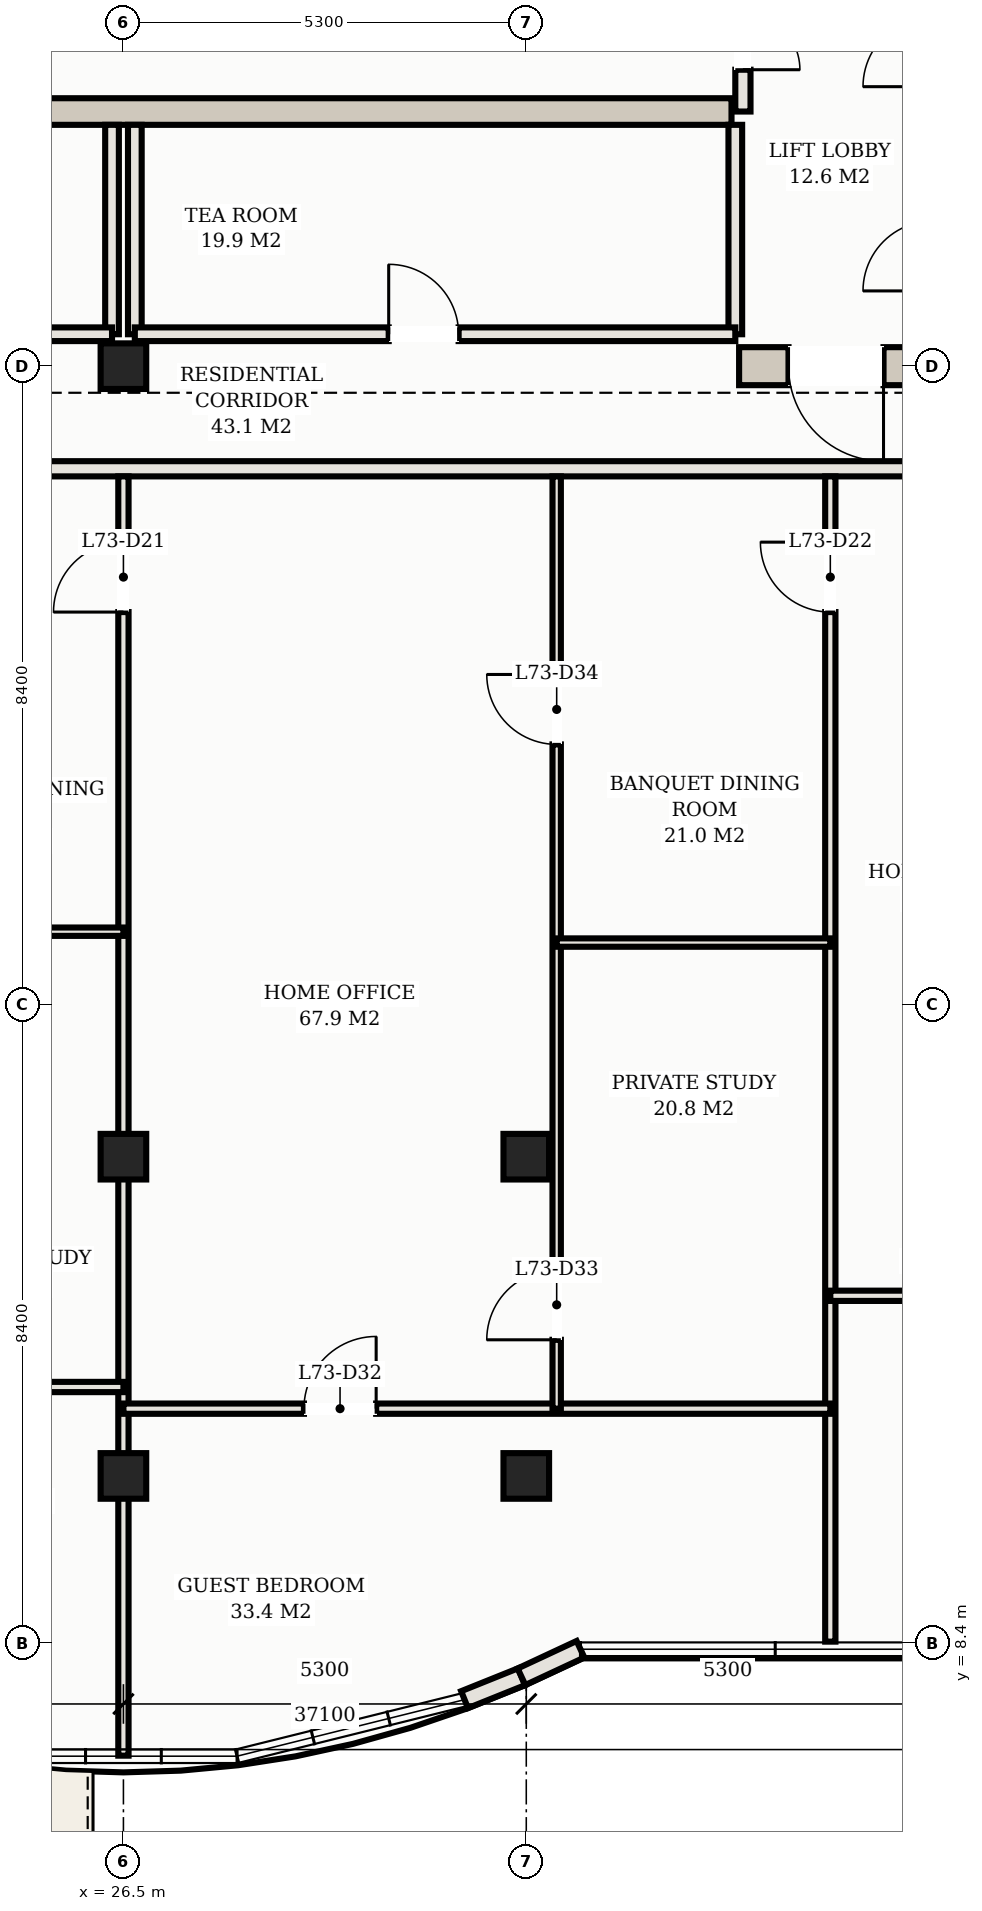
"""IFC4 building model, lengths in metres.
Left out: names, types, materials, properties, quantities, classifications, styles, units other than length and angle.
Written with IfcOpenShell. Run it as: python <this file> out.ifc"""

import sys

from ifc_helpers import new_model, si_unit, direction, frame, frame_2d, origin, origin_2d, place, context, subcontext, project, spatial, rectangle, hollow_rectangle, extrude, element, fill, save


model = new_model("IFC4")
c1 = context("Model", 3, precision=1e-05, world=origin(), true_north=direction((0.0, 1.0)))
c2 = subcontext(c1, "Body", "Model", "MODEL_VIEW")
j1 = project(units=[si_unit("LENGTHUNIT", "METRE"), si_unit("PLANEANGLEUNIT", "RADIAN")], contexts=[c1])
p1 = place(None, origin())
s1 = spatial("IfcSite", under=j1, at=p1, CompositionType="ELEMENT")
p2 = place(p1, origin())
s2 = spatial("IfcBuilding", under=s1, at=p2, CompositionType="ELEMENT")
p3 = place(p2, frame((0.0, 0.0, 262.7)))
s3 = spatial("IfcBuildingStorey", under=s2, at=p3, CompositionType="ELEMENT", Elevation=262.7)
p4 = place(p3, frame((34.6, 25.2, 0.0), z_axis=(0.0, 0.0, 1.0), x_axis=(1.0, 0.0, 0.0)))
e1 = element("IfcWall", 1, at=p4, inside=s3, PredefinedType="SHEAR", context=c2, shape_type="SweptSolid", body=[
    extrude(rectangle(XDim=8.05, YDim=0.5, at=frame_2d((4.025, 0.0))), origin(), (0.0, 0.0, 1.0), 3.04),
])
p5 = place(p4, frame((0.65, 0.0, 0.0)))
e2 = element("IfcOpeningElement", 2, at=p5, cuts=e1, PredefinedType="OPENING", context=c2, shape_type="SweptSolid", body=[
    extrude(rectangle(XDim=1.25, YDim=2.2, at=frame_2d((0.625, 1.1))), frame((0.0, 0.26, 0.0), z_axis=(0.0, -1.0, 0.0), x_axis=(1.0, 0.0, 0.0)), (0.0, 0.0, 1.0), 0.52),
])
p6 = place(p3, frame((18.5, 28.55, 0.0), z_axis=(0.0, 0.0, 1.0), x_axis=(1.0, 0.0, 0.0)))
e3 = element("IfcWall", 3, at=p6, inside=s3, PredefinedType="SHEAR", context=c2, shape_type="SweptSolid", body=[
    extrude(rectangle(XDim=16.0, YDim=0.35, at=frame_2d((8.0, 0.0))), origin(), (0.0, 0.0, 1.0), 3.04),
])
for number, where, z_axis, x_axis in (
    (4, (26.5, 25.2, 0.0), (0.0, 0.0, 1.0), (1.0, 0.0, 0.0)),
    (5, (26.5, 14.8, 0.0), (0.0, 0.0, 1.0), (1.0, 0.0, 0.0)),
):
    element("IfcColumn", number, at=place(p3, frame(where, z_axis=z_axis, x_axis=x_axis)), inside=s3, PredefinedType="COLUMN", context=c2, shape_type="SweptSolid", body=[
        extrude(hollow_rectangle(XDim=0.6, YDim=0.6, WallThickness=0.022, at=origin_2d()), origin(), (0.0, 0.0, 1.0), 3.3),
    ])
p7 = place(p3, frame((26.5, 10.6, 0.0), z_axis=(0.0, 0.0, 1.0), x_axis=(1.0, 0.0, 0.0)))
e6 = element("IfcColumn", 6, at=p7, inside=s3, PredefinedType="COLUMN", context=c2, shape_type="SweptSolid", body=[
    extrude(hollow_rectangle(XDim=0.6, YDim=0.6, WallThickness=0.022, at=origin_2d()), origin(), (0.0, 0.0, 1.0), 3.264),
])
p8 = place(p3, frame((31.8, 14.8, 0.0), z_axis=(0.0, 0.0, 1.0), x_axis=(1.0, 0.0, 0.0)))
e7 = element("IfcColumn", 7, at=p8, inside=s3, PredefinedType="COLUMN", context=c2, shape_type="SweptSolid", body=[
    extrude(hollow_rectangle(XDim=0.6, YDim=0.6, WallThickness=0.022, at=origin_2d()), origin(), (0.0, 0.0, 1.0), 3.3),
])
p9 = place(p3, frame((31.8, 10.6, 0.0), z_axis=(0.0, 0.0, 1.0), x_axis=(1.0, 0.0, 0.0)))
e8 = element("IfcColumn", 8, at=p9, inside=s3, PredefinedType="COLUMN", context=c2, shape_type="SweptSolid", body=[
    extrude(hollow_rectangle(XDim=0.6, YDim=0.6, WallThickness=0.022, at=origin_2d()), origin(), (0.0, 0.0, 1.0), 3.264),
])
p10 = place(p3, frame((30.988, 7.657, 0.0), z_axis=(0.0, 0.0, 1.0), x_axis=(0.927870589467, 0.372902358805, 0.0)))
e9 = element("IfcWall", 9, at=p10, inside=s3, PredefinedType="SOLIDWALL", context=c2, shape_type="SweptSolid", body=[
    extrude(rectangle(XDim=0.807, YDim=0.24, at=frame_2d((0.404, 0.0))), origin(), (0.0, 0.0, 1.0), 3.04),
])
p11 = place(p3, frame((31.737, 7.958, 0.0), z_axis=(0.0, 0.0, 1.0), x_axis=(0.906190424584, 0.422869855147, 0.0)))
e10 = element("IfcWall", 10, at=p11, inside=s3, PredefinedType="SOLIDWALL", context=c2, shape_type="SweptSolid", body=[
    extrude(rectangle(XDim=0.856, YDim=0.24, at=frame_2d((0.428, 0.0))), origin(), (0.0, 0.0, 1.0), 3.04),
])
p12 = place(p3, frame((34.65, 28.55, 0.0), z_axis=(0.0, 0.0, 1.0), x_axis=(0.0, 1.0, 0.0)))
e11 = element("IfcWall", 11, at=p12, inside=s3, PredefinedType="PARTITIONING", context=c2, shape_type="SweptSolid", body=[
    extrude(rectangle(XDim=2.6, YDim=0.2, at=frame_2d((1.3, 0.0))), origin(), (0.0, 0.0, 1.0), 2.38),
])
p13 = place(p12, frame((0.55, 0.0, 0.0)))
e12 = element("IfcOpeningElement", 12, at=p13, cuts=e11, PredefinedType="OPENING", context=c2, shape_type="SweptSolid", body=[
    extrude(rectangle(XDim=1.5, YDim=2.25, at=frame_2d((0.75, 1.125))), frame((0.0, 0.11, 0.0), z_axis=(0.0, -1.0, 0.0), x_axis=(1.0, 0.0, 0.0)), (0.0, 0.0, 1.0), 0.22),
])
p14 = place(p3, frame((26.35, 25.62, 0.0), z_axis=(0.0, 0.0, 1.0), x_axis=(0.0, 1.0, 0.0)))
e13 = element("IfcWall", 13, at=p14, inside=s3, PredefinedType="PARTITIONING", context=c2, shape_type="SweptSolid", body=[
    extrude(rectangle(XDim=2.755, YDim=0.18, at=frame_2d((1.377, 0.0))), origin(), (0.0, 0.0, 1.0), 2.38),
])
p15 = place(p3, frame((18.45, 25.62, 0.0), z_axis=(0.0, 0.0, 1.0), x_axis=(1.0, 0.0, 0.0)))
e14 = element("IfcWall", 14, at=p15, inside=s3, PredefinedType="PARTITIONING", context=c2, shape_type="SweptSolid", body=[
    extrude(rectangle(XDim=7.9, YDim=0.18, at=frame_2d((3.95, 0.0))), origin(), (0.0, 0.0, 1.0), 2.38),
])
p16 = place(p15, frame((3.34, 0.0, 0.0)))
e15 = element("IfcOpeningElement", 15, at=p16, cuts=e14, PredefinedType="OPENING", context=c2, shape_type="SweptSolid", body=[
    extrude(rectangle(XDim=0.92, YDim=2.15, at=frame_2d((0.46, 1.075))), frame((0.0, 0.1, 0.0), z_axis=(0.0, -1.0, 0.0), x_axis=(1.0, 0.0, 0.0)), (0.0, 0.0, 1.0), 0.2),
])
for number, where, z_axis, x_axis in (
    (16, (26.65, 25.62, 0.0), (0.0, 0.0, 1.0), (0.0, 1.0, 0.0)),
    (17, (34.55, 25.62, 0.0), (0.0, 0.0, 1.0), (0.0, 1.0, 0.0)),
):
    element("IfcWall", number, at=place(p3, frame(where, z_axis=z_axis, x_axis=x_axis)), inside=s3, PredefinedType="PARTITIONING", context=c2, shape_type="SweptSolid", body=[
        extrude(rectangle(XDim=2.755, YDim=0.18, at=frame_2d((1.377, 0.0))), origin(), (0.0, 0.0, 1.0), 2.38),
    ])
p17 = place(p3, frame((26.65, 25.62, 0.0), z_axis=(0.0, 0.0, 1.0), x_axis=(1.0, 0.0, 0.0)))
e18 = element("IfcWall", 18, at=p17, inside=s3, PredefinedType="PARTITIONING", context=c2, shape_type="SweptSolid", body=[
    extrude(rectangle(XDim=7.9, YDim=0.18, at=frame_2d((3.95, 0.0))), origin(), (0.0, 0.0, 1.0), 2.38),
])
p18 = place(p17, frame((3.34, 0.0, 0.0)))
e19 = element("IfcOpeningElement", 19, at=p18, cuts=e18, PredefinedType="OPENING", context=c2, shape_type="SweptSolid", body=[
    extrude(rectangle(XDim=0.92, YDim=2.15, at=frame_2d((0.46, 1.075))), frame((0.0, 0.1, 0.0), z_axis=(0.0, -1.0, 0.0), x_axis=(1.0, 0.0, 0.0)), (0.0, 0.0, 1.0), 0.2),
])
p19 = place(p3, frame((8.6, 23.85, 0.0), z_axis=(0.0, 0.0, 1.0), x_axis=(1.0, 0.0, 0.0)))
e20 = element("IfcWall", 20, at=p19, inside=s3, PredefinedType="PARTITIONING", context=c2, shape_type="SweptSolid", body=[
    extrude(rectangle(XDim=35.8, YDim=0.2, at=frame_2d((17.9, 0.0))), origin(), (0.0, 0.0, 1.0), 2.38),
])
p20 = place(p19, frame((2.625, 0.0, 0.0)))
e21 = element("IfcOpeningElement", 21, at=p20, cuts=e20, PredefinedType="OPENING", context=c2, shape_type="SweptSolid", body=[
    extrude(rectangle(XDim=1.35, YDim=2.26, at=frame_2d((0.675, 1.13))), frame((0.0, 0.11, 0.0), z_axis=(0.0, -1.0, 0.0), x_axis=(1.0, 0.0, 0.0)), (0.0, 0.0, 1.0), 0.22),
])
p21 = place(p19, frame((0.505, 0.0, 0.0)))
e22 = element("IfcOpeningElement", 22, at=p21, cuts=e20, PredefinedType="OPENING", context=c2, shape_type="SweptSolid", body=[
    extrude(rectangle(XDim=0.9, YDim=2.15, at=frame_2d((0.45, 1.075))), frame((0.0, 0.11, 0.0), z_axis=(0.0, -1.0, 0.0), x_axis=(1.0, 0.0, 0.0)), (0.0, 0.0, 1.0), 0.22),
])
p22 = place(p19, frame((34.395, 0.0, 0.0)))
e23 = element("IfcOpeningElement", 23, at=p22, cuts=e20, PredefinedType="OPENING", context=c2, shape_type="SweptSolid", body=[
    extrude(rectangle(XDim=0.9, YDim=2.15, at=frame_2d((0.45, 1.075))), frame((0.0, 0.11, 0.0), z_axis=(0.0, -1.0, 0.0), x_axis=(1.0, 0.0, 0.0)), (0.0, 0.0, 1.0), 0.22),
])
p23 = place(p3, frame((26.5, 6.92, 0.0), z_axis=(0.0, 0.0, 1.0), x_axis=(0.0, 1.0, 0.0)))
e24 = element("IfcWall", 24, at=p23, inside=s3, PredefinedType="PARTITIONING", context=c2, shape_type="SweptSolid", body=[
    extrude(rectangle(XDim=16.83, YDim=0.135, at=frame_2d((8.415, 0.0))), origin(), (0.0, 0.0, 1.0), 2.38),
])
p24 = place(p23, frame((15.045, 0.0, 0.0)))
e25 = element("IfcOpeningElement", 25, at=p24, cuts=e24, PredefinedType="OPENING", context=c2, shape_type="SweptSolid", body=[
    extrude(rectangle(XDim=0.92, YDim=2.15, at=frame_2d((0.46, 1.075))), frame((0.0, 0.078, 0.0), z_axis=(0.0, -1.0, 0.0), x_axis=(1.0, 0.0, 0.0)), (0.0, 0.0, 1.0), 0.155),
])
p25 = place(p3, frame((35.8, 8.42, 0.0), z_axis=(0.0, 0.0, 1.0), x_axis=(0.0, 1.0, 0.0)))
e26 = element("IfcWall", 26, at=p25, inside=s3, PredefinedType="PARTITIONING", context=c2, shape_type="SweptSolid", body=[
    extrude(rectangle(XDim=15.33, YDim=0.135, at=frame_2d((7.665, 0.0))), origin(), (0.0, 0.0, 1.0), 2.38),
])
p26 = place(p25, frame((13.545, 0.0, 0.0)))
e27 = element("IfcOpeningElement", 27, at=p26, cuts=e26, PredefinedType="OPENING", context=c2, shape_type="SweptSolid", body=[
    extrude(rectangle(XDim=0.92, YDim=2.15, at=frame_2d((0.46, 1.075))), frame((0.0, 0.078, 0.0), z_axis=(0.0, -1.0, 0.0), x_axis=(1.0, 0.0, 0.0)), (0.0, 0.0, 1.0), 0.155),
])
p27 = place(p3, frame((21.2, 11.77, 0.0), z_axis=(0.0, 0.0, 1.0), x_axis=(1.0, 0.0, 0.0)))
e28 = element("IfcWall", 28, at=p27, inside=s3, PredefinedType="PARTITIONING", context=c2, shape_type="SweptSolid", body=[
    extrude(rectangle(XDim=5.3, YDim=0.135, at=frame_2d((2.65, 0.0))), origin(), (0.0, 0.0, 1.0), 2.38),
])
p28 = place(p27, frame((0.8, 0.0, 0.0)))
e29 = element("IfcOpeningElement", 29, at=p28, cuts=e28, PredefinedType="OPENING", context=c2, shape_type="SweptSolid", body=[
    extrude(rectangle(XDim=0.95, YDim=2.15, at=frame_2d((0.475, 1.075))), frame((0.0, 0.078, 0.0), z_axis=(0.0, -1.0, 0.0), x_axis=(1.0, 0.0, 0.0)), (0.0, 0.0, 1.0), 0.155),
])
p29 = place(p3, frame((23.35, 17.76, 0.0), z_axis=(0.0, 0.0, 1.0), x_axis=(1.0, 0.0, 0.0)))
e30 = element("IfcWall", 30, at=p29, inside=s3, PredefinedType="MOVABLE", context=c2, shape_type="SweptSolid", body=[
    extrude(rectangle(XDim=3.15, YDim=0.11, at=frame_2d((1.575, 0.0))), origin(), (0.0, 0.0, 1.0), 2.38),
])
p30 = place(p3, frame((26.5, 11.485, 0.0), z_axis=(0.0, 0.0, 1.0), x_axis=(1.0, 0.0, 0.0)))
e31 = element("IfcWall", 31, at=p30, inside=s3, PredefinedType="PARTITIONING", context=c2, shape_type="SweptSolid", body=[
    extrude(rectangle(XDim=9.3, YDim=0.135, at=frame_2d((4.65, 0.0))), origin(), (0.0, 0.0, 1.0), 2.38),
])
p31 = place(p30, frame((2.375, 0.0, 0.0)))
e32 = element("IfcOpeningElement", 32, at=p31, cuts=e31, PredefinedType="OPENING", context=c2, shape_type="SweptSolid", body=[
    extrude(rectangle(XDim=0.95, YDim=2.15, at=frame_2d((0.475, 1.075))), frame((0.0, 0.078, 0.0), z_axis=(0.0, -1.0, 0.0), x_axis=(1.0, 0.0, 0.0)), (0.0, 0.0, 1.0), 0.155),
])
p32 = place(p3, frame((32.2, 11.485, 0.0), z_axis=(0.0, 0.0, 1.0), x_axis=(0.0, 1.0, 0.0)))
e33 = element("IfcWall", 33, at=p32, inside=s3, PredefinedType="MOVABLE", context=c2, shape_type="SweptSolid", body=[
    extrude(rectangle(XDim=12.265, YDim=0.11, at=frame_2d((6.132, 0.0))), origin(), (0.0, 0.0, 1.0), 2.38),
])
p33 = place(p32, frame((0.906, 0.0, 0.0)))
e34 = element("IfcOpeningElement", 34, at=p33, cuts=e33, PredefinedType="OPENING", context=c2, shape_type="SweptSolid", body=[
    extrude(rectangle(XDim=0.92, YDim=2.15, at=frame_2d((0.46, 1.075))), frame((0.0, 0.065, 0.0), z_axis=(0.0, -1.0, 0.0), x_axis=(1.0, 0.0, 0.0)), (0.0, 0.0, 1.0), 0.13),
])
p34 = place(p32, frame((8.739, 0.0, 0.0)))
e35 = element("IfcOpeningElement", 35, at=p34, cuts=e33, PredefinedType="OPENING", context=c2, shape_type="SweptSolid", body=[
    extrude(rectangle(XDim=0.92, YDim=2.15, at=frame_2d((0.46, 1.075))), frame((0.0, 0.065, 0.0), z_axis=(0.0, -1.0, 0.0), x_axis=(1.0, 0.0, 0.0)), (0.0, 0.0, 1.0), 0.13),
])
p35 = place(p3, frame((32.2, 17.617, 0.0), z_axis=(0.0, 0.0, 1.0), x_axis=(1.0, 0.0, 0.0)))
e36 = element("IfcWall", 36, at=p35, inside=s3, PredefinedType="MOVABLE", context=c2, shape_type="SweptSolid", body=[
    extrude(rectangle(XDim=3.6, YDim=0.11, at=frame_2d((1.8, 0.0))), origin(), (0.0, 0.0, 1.0), 2.38),
])
p36 = place(p3, frame((35.8, 12.97, 0.0), z_axis=(0.0, 0.0, 1.0), x_axis=(1.0, 0.0, 0.0)))
e37 = element("IfcWall", 37, at=p36, inside=s3, PredefinedType="PARTITIONING", context=c2, shape_type="SweptSolid", body=[
    extrude(rectangle(XDim=6.6, YDim=0.135, at=frame_2d((3.3, 0.0))), origin(), (0.0, 0.0, 1.0), 2.38),
])
p37 = place(p36, frame((1.025, 0.0, 0.0)))
e38 = element("IfcOpeningElement", 38, at=p37, cuts=e37, PredefinedType="OPENING", context=c2, shape_type="SweptSolid", body=[
    extrude(rectangle(XDim=0.95, YDim=2.15, at=frame_2d((0.475, 1.075))), frame((0.0, 0.078, 0.0), z_axis=(0.0, -1.0, 0.0), x_axis=(1.0, 0.0, 0.0)), (0.0, 0.0, 1.0), 0.155),
])
p38 = place(p5, frame((1.25, 0.0, 0.0), z_axis=(0.0, 0.0, 1.0), x_axis=(-1.0, 0.0, 0.0)))
e39 = element("IfcDoor", 39, at=p38, inside=s3, OperationType="SINGLE_SWING_LEFT", PredefinedType="DOOR", context=c2, shape_type="SweptSolid", body=[
    extrude(rectangle(XDim=1.25, YDim=2.2, at=frame_2d((0.625, 1.1))), frame((0.0, 0.025, 0.0), z_axis=(0.0, -1.0, 0.0), x_axis=(1.0, 0.0, 0.0)), (0.0, 0.0, 1.0), 0.05),
])
fill(e2, e39)
p39 = place(p13, frame((1.5, 0.0, 0.0), z_axis=(0.0, 0.0, 1.0), x_axis=(-1.0, 0.0, 0.0)))
e40 = element("IfcDoor", 40, at=p39, inside=s3, OperationType="DOUBLE_DOOR_SINGLE_SWING", PredefinedType="DOOR", context=c2, shape_type="SweptSolid", body=[
    extrude(rectangle(XDim=1.5, YDim=2.25, at=frame_2d((0.75, 1.125))), frame((0.0, 0.025, 0.0), z_axis=(0.0, -1.0, 0.0), x_axis=(1.0, 0.0, 0.0)), (0.0, 0.0, 1.0), 0.05),
])
fill(e12, e40)
p40 = place(p18, origin())
e41 = element("IfcDoor", 41, at=p40, inside=s3, OperationType="SINGLE_SWING_LEFT", PredefinedType="DOOR", context=c2, shape_type="SweptSolid", body=[
    extrude(rectangle(XDim=0.92, YDim=2.15, at=frame_2d((0.46, 1.075))), frame((0.0, 0.025, 0.0), z_axis=(0.0, -1.0, 0.0), x_axis=(1.0, 0.0, 0.0)), (0.0, 0.0, 1.0), 0.05),
])
fill(e19, e41)
p41 = place(p24, origin())
e42 = element("IfcDoor", 42, at=p41, inside=s3, OperationType="SINGLE_SWING_LEFT", PredefinedType="DOOR", context=c2, shape_type="SweptSolid", body=[
    extrude(rectangle(XDim=0.92, YDim=2.15, at=frame_2d((0.46, 1.075))), frame((0.0, 0.025, 0.0), z_axis=(0.0, -1.0, 0.0), x_axis=(1.0, 0.0, 0.0)), (0.0, 0.0, 1.0), 0.05),
])
fill(e25, e42)
p42 = place(p26, origin())
e43 = element("IfcDoor", 43, at=p42, inside=s3, OperationType="SINGLE_SWING_RIGHT", PredefinedType="DOOR", context=c2, shape_type="SweptSolid", body=[
    extrude(rectangle(XDim=0.92, YDim=2.15, at=frame_2d((0.46, 1.075))), frame((0.0, 0.025, 0.0), z_axis=(0.0, -1.0, 0.0), x_axis=(1.0, 0.0, 0.0)), (0.0, 0.0, 1.0), 0.05),
])
fill(e27, e43)
p43 = place(p31, origin())
e44 = element("IfcDoor", 44, at=p43, inside=s3, OperationType="SINGLE_SWING_RIGHT", PredefinedType="DOOR", context=c2, shape_type="SweptSolid", body=[
    extrude(rectangle(XDim=0.95, YDim=2.15, at=frame_2d((0.475, 1.075))), frame((0.0, 0.025, 0.0), z_axis=(0.0, -1.0, 0.0), x_axis=(1.0, 0.0, 0.0)), (0.0, 0.0, 1.0), 0.05),
])
fill(e32, e44)
p44 = place(p33, origin())
e45 = element("IfcDoor", 45, at=p44, inside=s3, OperationType="SINGLE_SWING_LEFT", PredefinedType="DOOR", context=c2, shape_type="SweptSolid", body=[
    extrude(rectangle(XDim=0.92, YDim=2.15, at=frame_2d((0.46, 1.075))), frame((0.0, 0.025, 0.0), z_axis=(0.0, -1.0, 0.0), x_axis=(1.0, 0.0, 0.0)), (0.0, 0.0, 1.0), 0.05),
])
fill(e34, e45)
p45 = place(p34, origin())
e46 = element("IfcDoor", 46, at=p45, inside=s3, OperationType="SINGLE_SWING_RIGHT", PredefinedType="DOOR", context=c2, shape_type="SweptSolid", body=[
    extrude(rectangle(XDim=0.92, YDim=2.15, at=frame_2d((0.46, 1.075))), frame((0.0, 0.025, 0.0), z_axis=(0.0, -1.0, 0.0), x_axis=(1.0, 0.0, 0.0)), (0.0, 0.0, 1.0), 0.05),
])
fill(e35, e46)
save(model, sys.argv[1])
